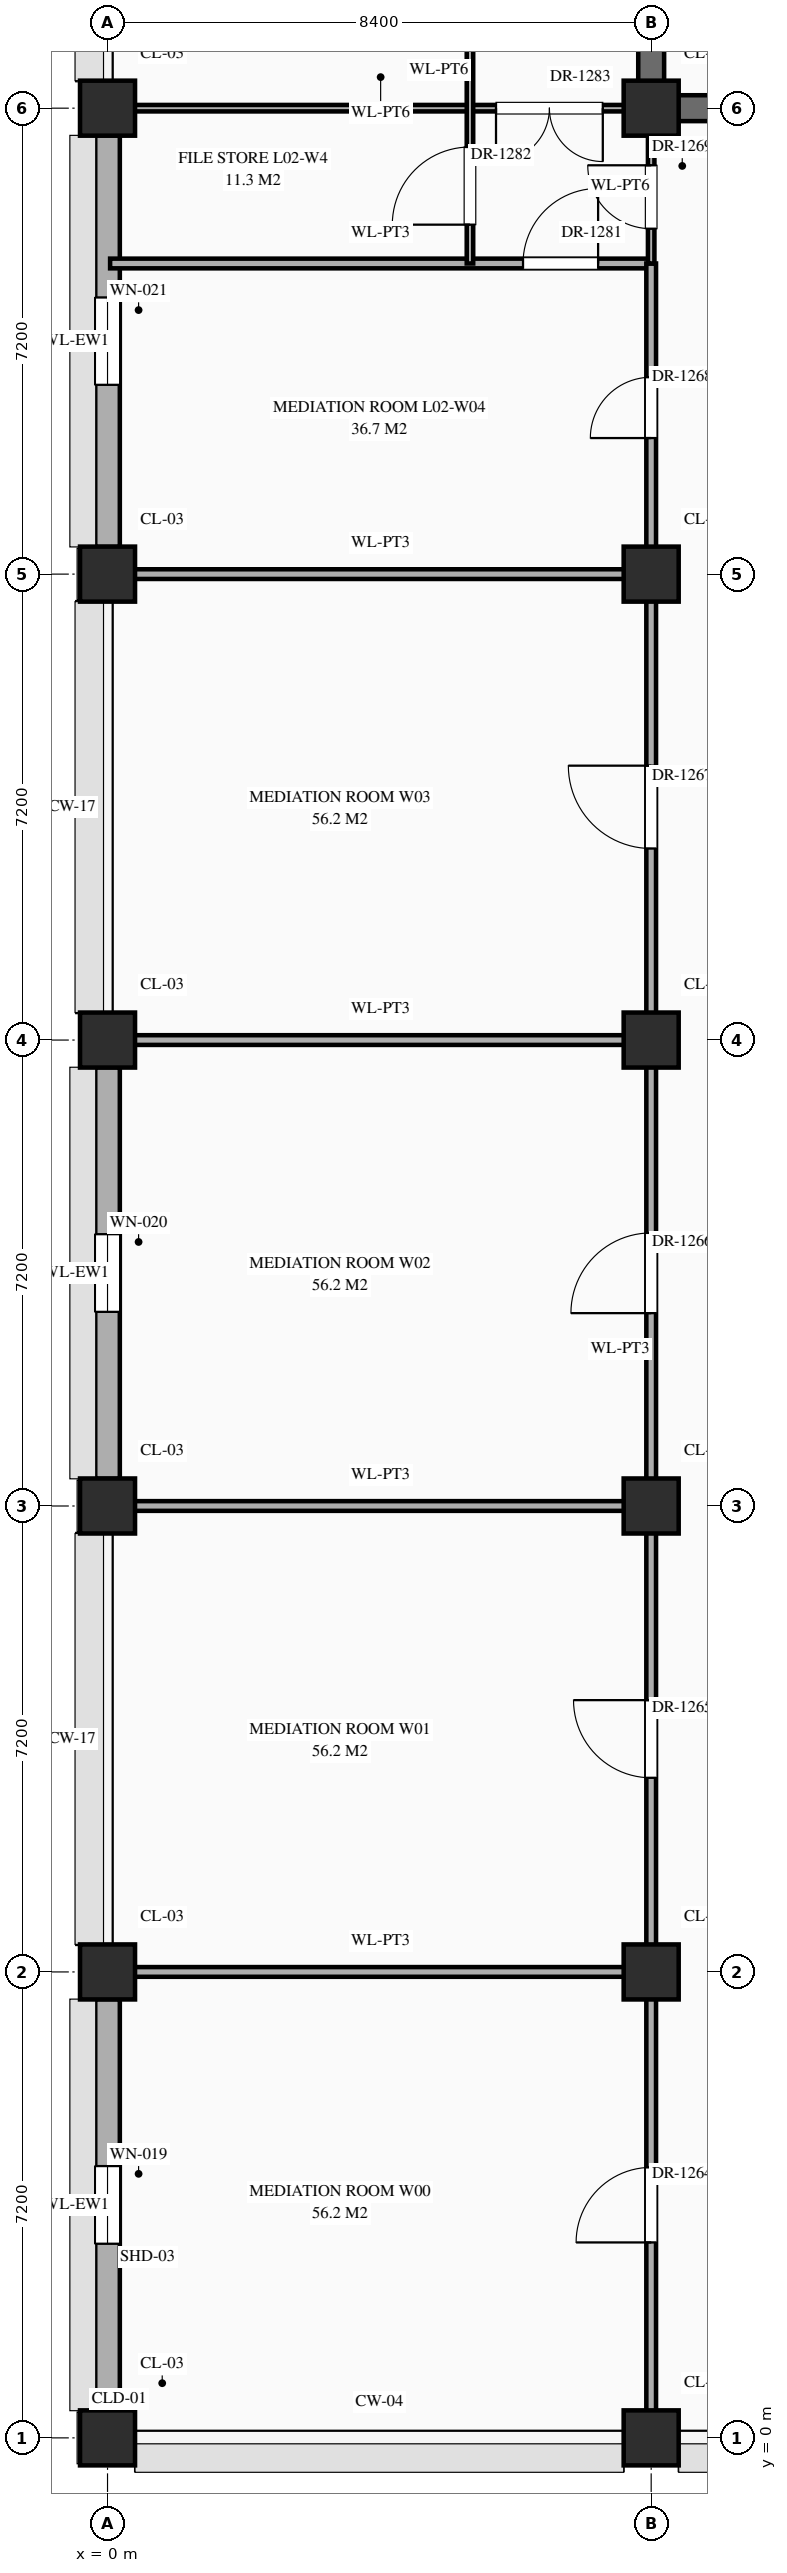
"""IFC4 building model, lengths in metres.
Left out: names, types, materials, properties, quantities, classifications, styles, units other than length and angle.
Written with IfcOpenShell. Run it as: python <this file> out.ifc"""

import sys

from ifc_helpers import new_model, si_unit, direction, frame, frame_2d, origin, origin_2d, place, context, subcontext, project, spatial, rectangle, extrude, element, fill, save


model = new_model("IFC4")
c1 = context("Model", 3, precision=1e-05, world=origin(), true_north=direction((0.0, 1.0)))
c2 = subcontext(c1, "Body", "Model", "MODEL_VIEW")
j1 = project(units=[si_unit("LENGTHUNIT", "METRE"), si_unit("PLANEANGLEUNIT", "RADIAN")], contexts=[c1])
p1 = place(None, origin())
s1 = spatial("IfcSite", under=j1, at=p1, CompositionType="ELEMENT")
p2 = place(p1, origin())
s2 = spatial("IfcBuilding", under=s1, at=p2, CompositionType="ELEMENT")
p3 = place(p2, frame((0.0, 0.0, 5.4)))
s3 = spatial("IfcBuildingStorey", under=s2, at=p3, CompositionType="ELEMENT", Elevation=5.4)
for number, where, z_axis, x_axis in (
    (1, (0.0, 0.0, 0.0), (0.0, 0.0, 1.0), (1.0, 0.0, 0.0)),
    (2, (0.0, 7.2, 0.0), (0.0, 0.0, 1.0), (1.0, 0.0, 0.0)),
    (3, (0.0, 14.4, 0.0), (0.0, 0.0, 1.0), (1.0, 0.0, 0.0)),
    (4, (0.0, 21.6, 0.0), (0.0, 0.0, 1.0), (1.0, 0.0, 0.0)),
    (5, (0.0, 28.8, 0.0), (0.0, 0.0, 1.0), (1.0, 0.0, 0.0)),
    (6, (0.0, 36.0, 0.0), (0.0, 0.0, 1.0), (1.0, 0.0, 0.0)),
    (7, (8.4, 0.0, 0.0), (0.0, 0.0, 1.0), (1.0, 0.0, 0.0)),
    (8, (8.4, 7.2, 0.0), (0.0, 0.0, 1.0), (1.0, 0.0, 0.0)),
    (9, (8.4, 14.4, 0.0), (0.0, 0.0, 1.0), (1.0, 0.0, 0.0)),
    (10, (8.4, 21.6, 0.0), (0.0, 0.0, 1.0), (1.0, 0.0, 0.0)),
    (11, (8.4, 28.8, 0.0), (0.0, 0.0, 1.0), (1.0, 0.0, 0.0)),
    (12, (8.4, 36.0, 0.0), (0.0, 0.0, 1.0), (1.0, 0.0, 0.0)),
):
    element("IfcColumn", number, at=place(p3, frame(where, z_axis=z_axis, x_axis=x_axis)), inside=s3, PredefinedType="COLUMN", context=c2, shape_type="SweptSolid", body=[
        extrude(rectangle(XDim=0.85, YDim=0.85, at=origin_2d()), origin(), (0.0, 0.0, 1.0), 5.4),
    ])
p4 = place(p3, frame((0.0, 0.42, 0.0), z_axis=(0.0, 0.0, 1.0), x_axis=(0.0, 1.0, 0.0)))
e13 = element("IfcWall", 13, at=p4, inside=s3, PredefinedType="STANDARD", context=c2, shape_type="SweptSolid", body=[
    extrude(rectangle(XDim=6.36, YDim=0.38, at=frame_2d((3.18, 0.0))), origin(), (0.0, 0.0, 1.0), 4.4),
])
p5 = place(p4, frame((2.58, 0.0, 0.85)))
e14 = element("IfcOpeningElement", 14, at=p5, cuts=e13, PredefinedType="OPENING", context=c2, shape_type="SweptSolid", body=[
    extrude(rectangle(XDim=1.2, YDim=1.56, at=frame_2d((0.6, 0.78))), frame((0.0, 0.202, 0.0), z_axis=(0.0, -1.0, 0.0), x_axis=(1.0, 0.0, 0.0)), (0.0, 0.0, 1.0), 0.404),
])
p6 = place(p3, frame((0.0, 14.82, 0.0), z_axis=(0.0, 0.0, 1.0), x_axis=(0.0, 1.0, 0.0)))
e15 = element("IfcWall", 15, at=p6, inside=s3, PredefinedType="STANDARD", context=c2, shape_type="SweptSolid", body=[
    extrude(rectangle(XDim=6.36, YDim=0.38, at=frame_2d((3.18, 0.0))), origin(), (0.0, 0.0, 1.0), 4.4),
])
p7 = place(p6, frame((2.58, 0.0, 0.85)))
e16 = element("IfcOpeningElement", 16, at=p7, cuts=e15, PredefinedType="OPENING", context=c2, shape_type="SweptSolid", body=[
    extrude(rectangle(XDim=1.2, YDim=1.92, at=frame_2d((0.6, 0.96))), frame((0.0, 0.202, 0.0), z_axis=(0.0, -1.0, 0.0), x_axis=(1.0, 0.0, 0.0)), (0.0, 0.0, 1.0), 0.404),
])
p8 = place(p3, frame((0.0, 29.22, 0.0), z_axis=(0.0, 0.0, 1.0), x_axis=(0.0, 1.0, 0.0)))
e17 = element("IfcWall", 17, at=p8, inside=s3, PredefinedType="STANDARD", context=c2, shape_type="SweptSolid", body=[
    extrude(rectangle(XDim=6.36, YDim=0.38, at=frame_2d((3.18, 0.0))), origin(), (0.0, 0.0, 1.0), 4.4),
])
p9 = place(p8, frame((2.505, 0.0, 0.85)))
e18 = element("IfcOpeningElement", 18, at=p9, cuts=e17, PredefinedType="OPENING", context=c2, shape_type="SweptSolid", body=[
    extrude(rectangle(XDim=1.35, YDim=1.2, at=frame_2d((0.675, 0.6))), frame((0.0, 0.202, 0.0), z_axis=(0.0, -1.0, 0.0), x_axis=(1.0, 0.0, 0.0)), (0.0, 0.0, 1.0), 0.404),
])
for number, where, z_axis, x_axis in (
    (19, (0.04, 7.2, 0.0), (0.0, 0.0, 1.0), (1.0, 0.0, 0.0)),
    (20, (0.04, 14.4, 0.0), (0.0, 0.0, 1.0), (1.0, 0.0, 0.0)),
    (21, (0.04, 21.6, 0.0), (0.0, 0.0, 1.0), (1.0, 0.0, 0.0)),
    (22, (0.04, 28.8, 0.0), (0.0, 0.0, 1.0), (1.0, 0.0, 0.0)),
):
    element("IfcWall", number, at=place(p3, frame(where, z_axis=z_axis, x_axis=x_axis)), inside=s3, PredefinedType="STANDARD", context=c2, shape_type="SweptSolid", body=[
        extrude(rectangle(XDim=8.36, YDim=0.15, at=frame_2d((4.18, 0.0))), origin(), (0.0, 0.0, 1.0), 4.2),
    ])
p10 = place(p3, frame((0.04, 33.6, 0.0), z_axis=(0.0, 0.0, 1.0), x_axis=(1.0, 0.0, 0.0)))
e23 = element("IfcWall", 23, at=p10, inside=s3, PredefinedType="STANDARD", context=c2, shape_type="SweptSolid", body=[
    extrude(rectangle(XDim=8.36, YDim=0.15, at=frame_2d((4.18, 0.0))), origin(), (0.0, 0.0, 1.0), 5.05),
])
p11 = place(p10, frame((6.38, 0.0, 0.0)))
e24 = element("IfcOpeningElement", 24, at=p11, cuts=e23, PredefinedType="OPENING", context=c2, shape_type="SweptSolid", body=[
    extrude(rectangle(XDim=1.16, YDim=2.3, at=frame_2d((0.58, 1.15))), frame((0.0, 0.087, 0.0), z_axis=(0.0, -1.0, 0.0), x_axis=(1.0, 0.0, 0.0)), (0.0, 0.0, 1.0), 0.174),
])
p12 = place(p3, frame((0.04, 36.0, 0.0), z_axis=(0.0, 0.0, 1.0), x_axis=(1.0, 0.0, 0.0)))
e25 = element("IfcWall", 25, at=p12, inside=s3, PredefinedType="STANDARD", context=c2, shape_type="SweptSolid", body=[
    extrude(rectangle(XDim=8.36, YDim=0.1, at=frame_2d((4.18, 0.0))), origin(), (0.0, 0.0, 1.0), 4.2),
])
p13 = place(p12, frame((5.962, 0.0, 0.0)))
e26 = element("IfcOpeningElement", 26, at=p13, cuts=e25, PredefinedType="OPENING", context=c2, shape_type="SweptSolid", body=[
    extrude(rectangle(XDim=1.65, YDim=2.4, at=frame_2d((0.825, 1.2))), frame((0.0, 0.062, 0.0), z_axis=(0.0, -1.0, 0.0), x_axis=(1.0, 0.0, 0.0)), (0.0, 0.0, 1.0), 0.124),
])
p14 = place(p3, frame((8.4, 36.0, 0.0), z_axis=(0.0, 0.0, 1.0), x_axis=(1.0, 0.0, 0.0)))
e27 = element("IfcWall", 27, at=p14, inside=s3, PredefinedType="SHEAR", context=c2, shape_type="SweptSolid", body=[
    extrude(rectangle(XDim=8.36, YDim=0.4, at=frame_2d((4.18, 0.0))), origin(), (0.0, 0.0, 1.0), 5.05),
])
p15 = place(p3, frame((5.6, 33.6, 0.0), z_axis=(0.0, 0.0, 1.0), x_axis=(0.0, 1.0, 0.0)))
e28 = element("IfcWall", 28, at=p15, inside=s3, PredefinedType="STANDARD", context=c2, shape_type="SweptSolid", body=[
    extrude(rectangle(XDim=12.0, YDim=0.1, at=frame_2d((6.0, 0.0))), origin(), (0.0, 0.0, 1.0), 5.12),
])
p16 = place(p15, frame((0.6, 0.0, 0.0)))
e29 = element("IfcOpeningElement", 29, at=p16, cuts=e28, PredefinedType="OPENING", context=c2, shape_type="SweptSolid", body=[
    extrude(rectangle(XDim=1.2, YDim=2.35, at=frame_2d((0.6, 1.175))), frame((0.0, 0.062, 0.0), z_axis=(0.0, -1.0, 0.0), x_axis=(1.0, 0.0, 0.0)), (0.0, 0.0, 1.0), 0.124),
])
p17 = place(p15, frame((5.36, 0.0, 0.0)))
e30 = element("IfcOpeningElement", 30, at=p17, cuts=e28, PredefinedType="OPENING", context=c2, shape_type="SweptSolid", body=[
    extrude(rectangle(XDim=1.28, YDim=2.35, at=frame_2d((0.64, 1.175))), frame((0.0, 0.062, 0.0), z_axis=(0.0, -1.0, 0.0), x_axis=(1.0, 0.0, 0.0)), (0.0, 0.0, 1.0), 0.124),
])
p18 = place(p15, frame((10.31, 0.0, 0.0)))
e31 = element("IfcOpeningElement", 31, at=p18, cuts=e28, PredefinedType="OPENING", context=c2, shape_type="SweptSolid", body=[
    extrude(rectangle(XDim=0.98, YDim=2.35, at=frame_2d((0.49, 1.175))), frame((0.0, 0.062, 0.0), z_axis=(0.0, -1.0, 0.0), x_axis=(1.0, 0.0, 0.0)), (0.0, 0.0, 1.0), 0.124),
])
p19 = place(p3, frame((8.4, 0.04, 0.0), z_axis=(0.0, 0.0, 1.0), x_axis=(0.0, 1.0, 0.0)))
e32 = element("IfcWall", 32, at=p19, inside=s3, PredefinedType="STANDARD", context=c2, shape_type="SweptSolid", body=[
    extrude(rectangle(XDim=33.56, YDim=0.15, at=frame_2d((16.78, 0.0))), origin(), (0.0, 0.0, 1.0), 4.3),
])
p20 = place(p19, frame((2.98, 0.0, 0.0)))
e33 = element("IfcOpeningElement", 33, at=p20, cuts=e32, PredefinedType="OPENING", context=c2, shape_type="SweptSolid", body=[
    extrude(rectangle(XDim=1.16, YDim=2.3, at=frame_2d((0.58, 1.15))), frame((0.0, 0.087, 0.0), z_axis=(0.0, -1.0, 0.0), x_axis=(1.0, 0.0, 0.0)), (0.0, 0.0, 1.0), 0.174),
])
p21 = place(p19, frame((10.16, 0.0, 0.0)))
e34 = element("IfcOpeningElement", 34, at=p21, cuts=e32, PredefinedType="OPENING", context=c2, shape_type="SweptSolid", body=[
    extrude(rectangle(XDim=1.2, YDim=2.35, at=frame_2d((0.6, 1.175))), frame((0.0, 0.087, 0.0), z_axis=(0.0, -1.0, 0.0), x_axis=(1.0, 0.0, 0.0)), (0.0, 0.0, 1.0), 0.174),
])
p22 = place(p19, frame((17.34, 0.0, 0.0)))
e35 = element("IfcOpeningElement", 35, at=p22, cuts=e32, PredefinedType="OPENING", context=c2, shape_type="SweptSolid", body=[
    extrude(rectangle(XDim=1.24, YDim=2.3, at=frame_2d((0.62, 1.15))), frame((0.0, 0.087, 0.0), z_axis=(0.0, -1.0, 0.0), x_axis=(1.0, 0.0, 0.0)), (0.0, 0.0, 1.0), 0.174),
])
p23 = place(p19, frame((24.52, 0.0, 0.0)))
e36 = element("IfcOpeningElement", 36, at=p23, cuts=e32, PredefinedType="OPENING", context=c2, shape_type="SweptSolid", body=[
    extrude(rectangle(XDim=1.28, YDim=2.35, at=frame_2d((0.64, 1.175))), frame((0.0, 0.087, 0.0), z_axis=(0.0, -1.0, 0.0), x_axis=(1.0, 0.0, 0.0)), (0.0, 0.0, 1.0), 0.174),
])
p24 = place(p19, frame((30.863, 0.0, 0.0)))
e37 = element("IfcOpeningElement", 37, at=p24, cuts=e32, PredefinedType="OPENING", context=c2, shape_type="SweptSolid", body=[
    extrude(rectangle(XDim=0.94, YDim=2.3, at=frame_2d((0.47, 1.15))), frame((0.0, 0.087, 0.0), z_axis=(0.0, -1.0, 0.0), x_axis=(1.0, 0.0, 0.0)), (0.0, 0.0, 1.0), 0.174),
])
p25 = place(p3, frame((8.4, 33.6, 0.0), z_axis=(0.0, 0.0, 1.0), x_axis=(0.0, 1.0, 0.0)))
e38 = element("IfcWall", 38, at=p25, inside=s3, PredefinedType="STANDARD", context=c2, shape_type="SweptSolid", body=[
    extrude(rectangle(XDim=2.4, YDim=0.1, at=frame_2d((1.2, 0.0))), origin(), (0.0, 0.0, 1.0), 4.3),
])
p26 = place(p25, frame((0.538, 0.0, 0.0)))
e39 = element("IfcOpeningElement", 39, at=p26, cuts=e38, PredefinedType="OPENING", context=c2, shape_type="SweptSolid", body=[
    extrude(rectangle(XDim=0.98, YDim=2.35, at=frame_2d((0.49, 1.175))), frame((0.0, 0.062, 0.0), z_axis=(0.0, -1.0, 0.0), x_axis=(1.0, 0.0, 0.0)), (0.0, 0.0, 1.0), 0.124),
])
p27 = place(p3, frame((8.4, 36.0, 0.0), z_axis=(0.0, 0.0, 1.0), x_axis=(0.0, 1.0, 0.0)))
e40 = element("IfcWall", 40, at=p27, inside=s3, PredefinedType="SHEAR", context=c2, shape_type="SweptSolid", body=[
    extrude(rectangle(XDim=4.8, YDim=0.4, at=frame_2d((2.4, 0.0))), origin(), (0.0, 0.0, 1.0), 5.12),
])
p28 = place(p5, origin())
e41 = element("IfcWindow", 41, at=p28, inside=s3, PartitioningType="SINGLE_PANEL", PredefinedType="WINDOW", context=c2, shape_type="SweptSolid", body=[
    extrude(rectangle(XDim=1.2, YDim=1.56, at=frame_2d((0.6, 0.78))), frame((0.0, 0.03, 0.0), z_axis=(0.0, -1.0, 0.0), x_axis=(1.0, 0.0, 0.0)), (0.0, 0.0, 1.0), 0.06),
])
fill(e14, e41)
p29 = place(p7, origin())
e42 = element("IfcWindow", 42, at=p29, inside=s3, PartitioningType="SINGLE_PANEL", PredefinedType="WINDOW", context=c2, shape_type="SweptSolid", body=[
    extrude(rectangle(XDim=1.2, YDim=1.92, at=frame_2d((0.6, 0.96))), frame((0.0, 0.03, 0.0), z_axis=(0.0, -1.0, 0.0), x_axis=(1.0, 0.0, 0.0)), (0.0, 0.0, 1.0), 0.06),
])
fill(e16, e42)
p30 = place(p9, origin())
e43 = element("IfcWindow", 43, at=p30, inside=s3, PartitioningType="SINGLE_PANEL", PredefinedType="WINDOW", context=c2, shape_type="SweptSolid", body=[
    extrude(rectangle(XDim=1.35, YDim=1.2, at=frame_2d((0.675, 0.6))), frame((0.0, 0.03, 0.0), z_axis=(0.0, -1.0, 0.0), x_axis=(1.0, 0.0, 0.0)), (0.0, 0.0, 1.0), 0.06),
])
fill(e18, e43)
p31 = place(p20, origin())
e44 = element("IfcDoor", 44, at=p31, inside=s3, OperationType="SINGLE_SWING_LEFT", PredefinedType="DOOR", context=c2, shape_type="SweptSolid", body=[
    extrude(rectangle(XDim=1.16, YDim=2.3, at=frame_2d((0.58, 1.15))), frame((0.0, 0.025, 0.0), z_axis=(0.0, -1.0, 0.0), x_axis=(1.0, 0.0, 0.0)), (0.0, 0.0, 1.0), 0.05),
])
fill(e33, e44)
p32 = place(p21, origin())
e45 = element("IfcDoor", 45, at=p32, inside=s3, OperationType="SINGLE_SWING_RIGHT", PredefinedType="DOOR", context=c2, shape_type="SweptSolid", body=[
    extrude(rectangle(XDim=1.2, YDim=2.35, at=frame_2d((0.6, 1.175))), frame((0.0, 0.025, 0.0), z_axis=(0.0, -1.0, 0.0), x_axis=(1.0, 0.0, 0.0)), (0.0, 0.0, 1.0), 0.05),
])
fill(e34, e45)
p33 = place(p22, origin())
e46 = element("IfcDoor", 46, at=p33, inside=s3, OperationType="SINGLE_SWING_LEFT", PredefinedType="DOOR", context=c2, shape_type="SweptSolid", body=[
    extrude(rectangle(XDim=1.24, YDim=2.3, at=frame_2d((0.62, 1.15))), frame((0.0, 0.025, 0.0), z_axis=(0.0, -1.0, 0.0), x_axis=(1.0, 0.0, 0.0)), (0.0, 0.0, 1.0), 0.05),
])
fill(e35, e46)
p34 = place(p23, origin())
e47 = element("IfcDoor", 47, at=p34, inside=s3, OperationType="SINGLE_SWING_RIGHT", PredefinedType="DOOR", context=c2, shape_type="SweptSolid", body=[
    extrude(rectangle(XDim=1.28, YDim=2.35, at=frame_2d((0.64, 1.175))), frame((0.0, 0.025, 0.0), z_axis=(0.0, -1.0, 0.0), x_axis=(1.0, 0.0, 0.0)), (0.0, 0.0, 1.0), 0.05),
])
fill(e36, e47)
p35 = place(p24, origin())
e48 = element("IfcDoor", 48, at=p35, inside=s3, OperationType="SINGLE_SWING_LEFT", PredefinedType="DOOR", context=c2, shape_type="SweptSolid", body=[
    extrude(rectangle(XDim=0.94, YDim=2.3, at=frame_2d((0.47, 1.15))), frame((0.0, 0.025, 0.0), z_axis=(0.0, -1.0, 0.0), x_axis=(1.0, 0.0, 0.0)), (0.0, 0.0, 1.0), 0.05),
])
fill(e37, e48)
p36 = place(p26, origin())
e49 = element("IfcDoor", 49, at=p36, inside=s3, OperationType="SINGLE_SWING_RIGHT", PredefinedType="DOOR", context=c2, shape_type="SweptSolid", body=[
    extrude(rectangle(XDim=0.98, YDim=2.35, at=frame_2d((0.49, 1.175))), frame((0.0, 0.025, 0.0), z_axis=(0.0, -1.0, 0.0), x_axis=(1.0, 0.0, 0.0)), (0.0, 0.0, 1.0), 0.05),
])
fill(e39, e49)
p37 = place(p11, origin())
e50 = element("IfcDoor", 50, at=p37, inside=s3, OperationType="SINGLE_SWING_RIGHT", PredefinedType="DOOR", context=c2, shape_type="SweptSolid", body=[
    extrude(rectangle(XDim=1.16, YDim=2.3, at=frame_2d((0.58, 1.15))), frame((0.0, 0.025, 0.0), z_axis=(0.0, -1.0, 0.0), x_axis=(1.0, 0.0, 0.0)), (0.0, 0.0, 1.0), 0.05),
])
fill(e24, e50)
p38 = place(p16, origin())
e51 = element("IfcDoor", 51, at=p38, inside=s3, OperationType="SINGLE_SWING_LEFT", PredefinedType="DOOR", context=c2, shape_type="SweptSolid", body=[
    extrude(rectangle(XDim=1.2, YDim=2.35, at=frame_2d((0.6, 1.175))), frame((0.0, 0.025, 0.0), z_axis=(0.0, -1.0, 0.0), x_axis=(1.0, 0.0, 0.0)), (0.0, 0.0, 1.0), 0.05),
])
fill(e29, e51)
p39 = place(p13, frame((1.65, 0.0, 0.0), z_axis=(0.0, 0.0, 1.0), x_axis=(-1.0, 0.0, 0.0)))
e52 = element("IfcDoor", 52, at=p39, inside=s3, OperationType="DOUBLE_DOOR_SINGLE_SWING", PredefinedType="DOOR", context=c2, shape_type="SweptSolid", body=[
    extrude(rectangle(XDim=1.65, YDim=2.4, at=frame_2d((0.825, 1.2))), frame((0.0, 0.025, 0.0), z_axis=(0.0, -1.0, 0.0), x_axis=(1.0, 0.0, 0.0)), (0.0, 0.0, 1.0), 0.05),
])
fill(e26, e52)
save(model, sys.argv[1])
